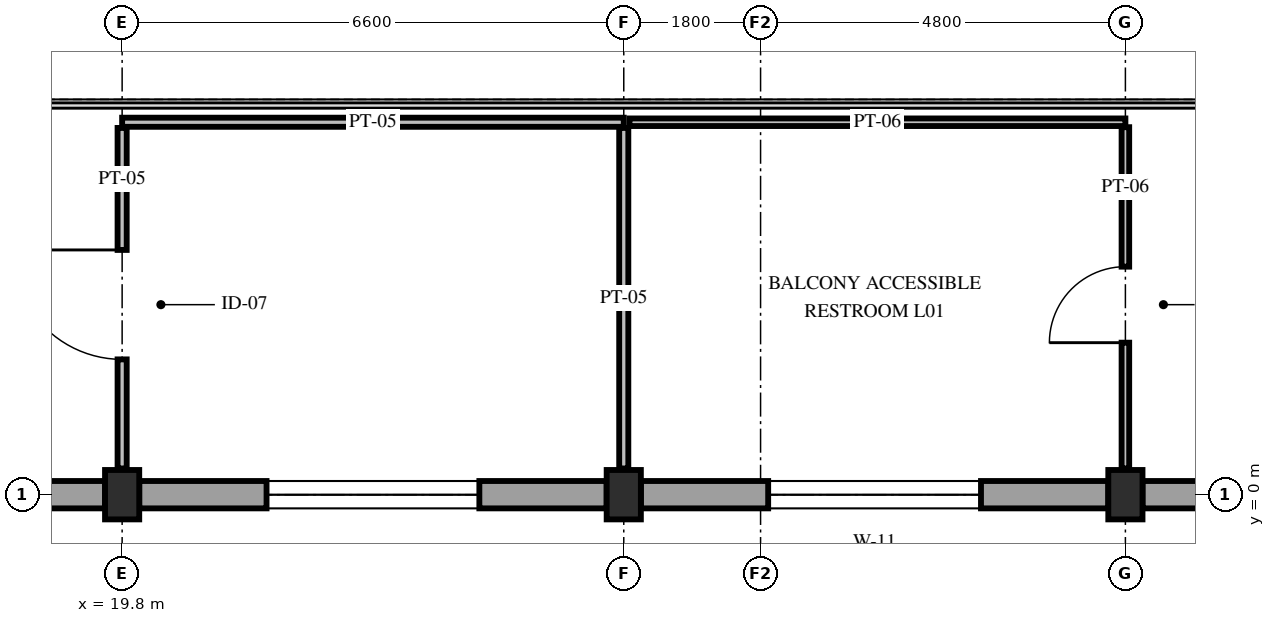
"""IFC4 building model, lengths in metres.
Left out: names, types, materials, properties, quantities, classifications, styles, units other than length and angle.
Written with IfcOpenShell. Run it as: python <this file> out.ifc"""

import sys

from ifc_helpers import new_model, si_unit, direction, frame, frame_2d, origin, origin_2d, place, context, subcontext, project, spatial, rectangle, extrude, element, fill, save


model = new_model("IFC4")
c1 = context("Model", 3, precision=1e-05, world=origin(), true_north=direction((0.0, 1.0)))
c2 = subcontext(c1, "Body", "Model", "MODEL_VIEW")
j1 = project(units=[si_unit("LENGTHUNIT", "METRE"), si_unit("PLANEANGLEUNIT", "RADIAN")], contexts=[c1])
p1 = place(None, origin())
s1 = spatial("IfcSite", under=j1, at=p1, CompositionType="ELEMENT")
p2 = place(p1, origin())
s2 = spatial("IfcBuilding", under=s1, at=p2, CompositionType="ELEMENT")
p3 = place(p2, frame((0.0, 0.0, 5.4)))
s3 = spatial("IfcBuildingStorey", under=s2, at=p3, CompositionType="ELEMENT", Elevation=5.4)
for number, where, z_axis, x_axis in (
    (1, (19.8, 0.0, 0.0), (0.0, 0.0, 1.0), (1.0, 0.0, 0.0)),
    (2, (26.4, 0.0, 0.0), (0.0, 0.0, 1.0), (1.0, 0.0, 0.0)),
    (3, (33.0, 0.0, 0.0), (0.0, 0.0, 1.0), (1.0, 0.0, 0.0)),
):
    element("IfcColumn", number, at=place(p3, frame(where, z_axis=z_axis, x_axis=x_axis)), inside=s3, PredefinedType="PILASTER", context=c2, shape_type="SweptSolid", body=[
        extrude(rectangle(XDim=0.45, YDim=0.65, at=origin_2d()), origin(), (0.0, 0.0, 1.0), 4.8),
    ])
p4 = place(p3, frame((39.375, 0.0, 0.0), z_axis=(0.0, 0.0, 1.0), x_axis=(-1.0, 0.0, 0.0)))
e4 = element("IfcWall", 4, at=p4, inside=s3, PredefinedType="STANDARD", context=c2, shape_type="SweptSolid", body=[
    extrude(rectangle(XDim=6.15, YDim=0.36, at=frame_2d((3.075, 0.0))), origin(), (0.0, 0.0, 1.0), 3.95),
])
p5 = place(p4, frame((1.675, 0.0, 0.85)))
e5 = element("IfcOpeningElement", 5, at=p5, cuts=e4, PredefinedType="OPENING", context=c2, shape_type="SweptSolid", body=[
    extrude(rectangle(XDim=2.8, YDim=1.5, at=frame_2d((1.4, 0.75))), frame((0.0, 0.195, 0.0), z_axis=(0.0, -1.0, 0.0), x_axis=(1.0, 0.0, 0.0)), (0.0, 0.0, 1.0), 0.39),
])
p6 = place(p3, frame((32.775, 0.0, 0.0), z_axis=(0.0, 0.0, 1.0), x_axis=(-1.0, 0.0, 0.0)))
e6 = element("IfcWall", 6, at=p6, inside=s3, PredefinedType="STANDARD", context=c2, shape_type="SweptSolid", body=[
    extrude(rectangle(XDim=6.15, YDim=0.36, at=frame_2d((3.075, 0.0))), origin(), (0.0, 0.0, 1.0), 3.95),
])
p7 = place(p6, frame((1.675, 0.0, 0.85)))
e7 = element("IfcOpeningElement", 7, at=p7, cuts=e6, PredefinedType="OPENING", context=c2, shape_type="SweptSolid", body=[
    extrude(rectangle(XDim=2.8, YDim=1.5, at=frame_2d((1.4, 0.75))), frame((0.0, 0.195, 0.0), z_axis=(0.0, -1.0, 0.0), x_axis=(1.0, 0.0, 0.0)), (0.0, 0.0, 1.0), 0.39),
])
p8 = place(p3, frame((26.175, 0.0, 0.0), z_axis=(0.0, 0.0, 1.0), x_axis=(-1.0, 0.0, 0.0)))
e8 = element("IfcWall", 8, at=p8, inside=s3, PredefinedType="STANDARD", context=c2, shape_type="SweptSolid", body=[
    extrude(rectangle(XDim=6.15, YDim=0.36, at=frame_2d((3.075, 0.0))), origin(), (0.0, 0.0, 1.0), 3.95),
])
p9 = place(p8, frame((1.675, 0.0, 0.85)))
e9 = element("IfcOpeningElement", 9, at=p9, cuts=e8, PredefinedType="OPENING", context=c2, shape_type="SweptSolid", body=[
    extrude(rectangle(XDim=2.8, YDim=1.5, at=frame_2d((1.4, 0.75))), frame((0.0, 0.195, 0.0), z_axis=(0.0, -1.0, 0.0), x_axis=(1.0, 0.0, 0.0)), (0.0, 0.0, 1.0), 0.39),
])
p10 = place(p3, frame((19.575, 0.0, 0.0), z_axis=(0.0, 0.0, 1.0), x_axis=(-1.0, 0.0, 0.0)))
e10 = element("IfcWall", 10, at=p10, inside=s3, PredefinedType="STANDARD", context=c2, shape_type="SweptSolid", body=[
    extrude(rectangle(XDim=6.15, YDim=0.36, at=frame_2d((3.075, 0.0))), origin(), (0.0, 0.0, 1.0), 3.95),
])
p11 = place(p10, frame((1.675, 0.0, 0.85)))
e11 = element("IfcOpeningElement", 11, at=p11, cuts=e10, PredefinedType="OPENING", context=c2, shape_type="SweptSolid", body=[
    extrude(rectangle(XDim=2.8, YDim=1.5, at=frame_2d((1.4, 0.75))), frame((0.0, 0.195, 0.0), z_axis=(0.0, -1.0, 0.0), x_axis=(1.0, 0.0, 0.0)), (0.0, 0.0, 1.0), 0.39),
])
p12 = place(p3, frame((19.8, 4.9, 0.0), z_axis=(0.0, 0.0, 1.0), x_axis=(1.0, 0.0, 0.0)))
e12 = element("IfcWall", 12, at=p12, inside=s3, PredefinedType="PARTITIONING", context=c2, shape_type="SweptSolid", body=[
    extrude(rectangle(XDim=6.6, YDim=0.12, at=frame_2d((3.3, 0.0))), origin(), (0.0, 0.0, 1.0), 4.48),
])
p13 = place(p3, frame((19.8, 0.345, 0.0), z_axis=(0.0, 0.0, 1.0), x_axis=(0.0, 1.0, 0.0)))
e13 = element("IfcWall", 13, at=p13, inside=s3, PredefinedType="PARTITIONING", context=c2, shape_type="SweptSolid", body=[
    extrude(rectangle(XDim=4.48, YDim=0.12, at=frame_2d((2.24, 0.0))), origin(), (0.0, 0.0, 1.0), 4.48),
])
p14 = place(p13, frame((1.435, 0.0, 0.0)))
e14 = element("IfcOpeningElement", 14, at=p14, cuts=e13, PredefinedType="OPENING", context=c2, shape_type="SweptSolid", body=[
    extrude(rectangle(XDim=1.44, YDim=2.25, at=frame_2d((0.72, 1.125))), frame((0.0, 0.075, 0.0), z_axis=(0.0, -1.0, 0.0), x_axis=(1.0, 0.0, 0.0)), (0.0, 0.0, 1.0), 0.15),
])
p15 = place(p3, frame((26.4, 0.345, 0.0), z_axis=(0.0, 0.0, 1.0), x_axis=(0.0, 1.0, 0.0)))
e15 = element("IfcWall", 15, at=p15, inside=s3, PredefinedType="PARTITIONING", context=c2, shape_type="SweptSolid", body=[
    extrude(rectangle(XDim=4.48, YDim=0.12, at=frame_2d((2.24, 0.0))), origin(), (0.0, 0.0, 1.0), 4.48),
])
p16 = place(p3, frame((26.475, 4.9, 0.0), z_axis=(0.0, 0.0, 1.0), x_axis=(1.0, 0.0, 0.0)))
e16 = element("IfcWall", 16, at=p16, inside=s3, PredefinedType="PARTITIONING", context=c2, shape_type="SweptSolid", body=[
    extrude(rectangle(XDim=6.525, YDim=0.1, at=frame_2d((3.262, 0.0))), origin(), (0.0, 0.0, 1.0), 4.48),
])
p17 = place(p3, frame((33.0, 0.345, 0.0), z_axis=(0.0, 0.0, 1.0), x_axis=(0.0, 1.0, 0.0)))
e17 = element("IfcWall", 17, at=p17, inside=s3, PredefinedType="PARTITIONING", context=c2, shape_type="SweptSolid", body=[
    extrude(rectangle(XDim=4.49, YDim=0.1, at=frame_2d((2.245, 0.0))), origin(), (0.0, 0.0, 1.0), 4.48),
])
p18 = place(p17, frame((1.655, 0.0, 0.0)))
e18 = element("IfcOpeningElement", 18, at=p18, cuts=e17, PredefinedType="OPENING", context=c2, shape_type="SweptSolid", body=[
    extrude(rectangle(XDim=1.0, YDim=2.15, at=frame_2d((0.5, 1.075))), frame((0.0, 0.065, 0.0), z_axis=(0.0, -1.0, 0.0), x_axis=(1.0, 0.0, 0.0)), (0.0, 0.0, 1.0), 0.13),
])
p19 = place(p7, origin())
e19 = element("IfcWindow", 19, at=p19, inside=s3, PartitioningType="DOUBLE_PANEL_VERTICAL", PredefinedType="WINDOW", context=c2, shape_type="SweptSolid", body=[
    extrude(rectangle(XDim=2.8, YDim=1.5, at=frame_2d((1.4, 0.75))), frame((0.0, 0.03, 0.0), z_axis=(0.0, -1.0, 0.0), x_axis=(1.0, 0.0, 0.0)), (0.0, 0.0, 1.0), 0.06),
])
fill(e7, e19)
p20 = place(p9, origin())
e20 = element("IfcWindow", 20, at=p20, inside=s3, PartitioningType="DOUBLE_PANEL_VERTICAL", PredefinedType="WINDOW", context=c2, shape_type="SweptSolid", body=[
    extrude(rectangle(XDim=2.8, YDim=1.5, at=frame_2d((1.4, 0.75))), frame((0.0, 0.03, 0.0), z_axis=(0.0, -1.0, 0.0), x_axis=(1.0, 0.0, 0.0)), (0.0, 0.0, 1.0), 0.06),
])
fill(e9, e20)
p21 = place(p14, origin())
e21 = element("IfcDoor", 21, at=p21, inside=s3, OperationType="SINGLE_SWING_RIGHT", PredefinedType="DOOR", context=c2, shape_type="SweptSolid", body=[
    extrude(rectangle(XDim=1.44, YDim=2.25, at=frame_2d((0.72, 1.125))), frame((0.0, 0.025, 0.0), z_axis=(0.0, -1.0, 0.0), x_axis=(1.0, 0.0, 0.0)), (0.0, 0.0, 1.0), 0.05),
])
fill(e14, e21)
p22 = place(p18, origin())
e22 = element("IfcDoor", 22, at=p22, inside=s3, OperationType="SINGLE_SWING_LEFT", PredefinedType="DOOR", context=c2, shape_type="SweptSolid", body=[
    extrude(rectangle(XDim=1.0, YDim=2.15, at=frame_2d((0.5, 1.075))), frame((0.0, 0.025, 0.0), z_axis=(0.0, -1.0, 0.0), x_axis=(1.0, 0.0, 0.0)), (0.0, 0.0, 1.0), 0.05),
])
fill(e18, e22)
save(model, sys.argv[1])
